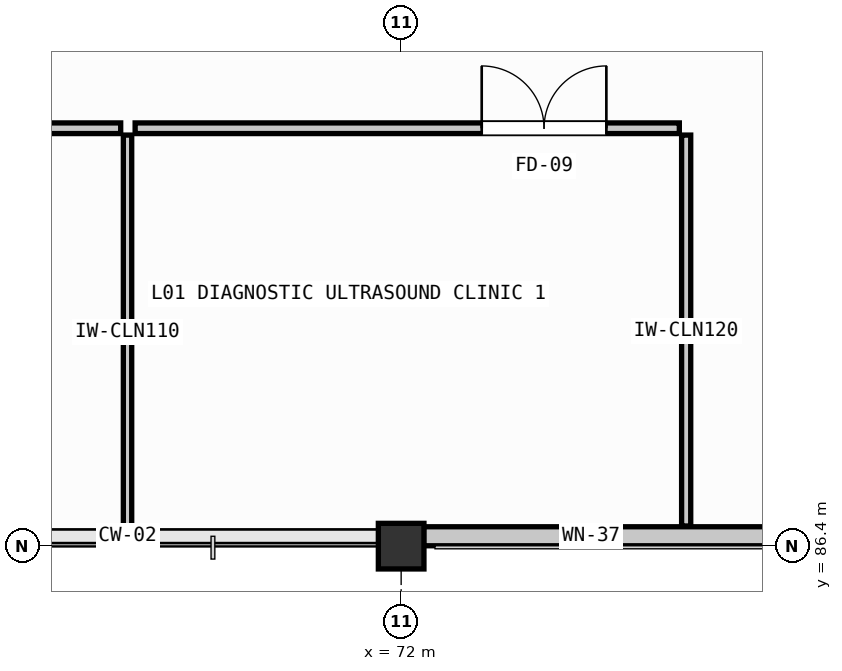
"""IFC4 building model, lengths in metres.
Left out: names, types, materials, properties, quantities, classifications, styles, units other than length and angle.
Written with IfcOpenShell. Run it as: python <this file> out.ifc"""

import sys

from ifc_helpers import new_model, si_unit, direction, frame, frame_2d, origin, origin_2d, place, context, subcontext, project, spatial, rectangle, extrude, element, fill, save


model = new_model("IFC4")
c1 = context("Model", 3, precision=1e-05, world=origin(), true_north=direction((0.0, 1.0)))
c2 = subcontext(c1, "Body", "Model", "MODEL_VIEW")
j1 = project(units=[si_unit("LENGTHUNIT", "METRE"), si_unit("PLANEANGLEUNIT", "RADIAN")], contexts=[c1])
p1 = place(None, origin())
s1 = spatial("IfcSite", under=j1, at=p1, CompositionType="ELEMENT")
p2 = place(p1, origin())
s2 = spatial("IfcBuilding", under=s1, at=p2, CompositionType="ELEMENT")
p3 = place(p2, origin())
s3 = spatial("IfcBuildingStorey", under=s2, at=p3, CompositionType="ELEMENT", Elevation=0.0)
p4 = place(p3, frame((72.0, 86.4, -0.25), z_axis=(0.0, 0.0, 1.0), x_axis=(1.0, 0.0, 0.0)))
e1 = element("IfcColumn", 1, at=p4, inside=s3, PredefinedType="COLUMN", context=c2, shape_type="SweptSolid", body=[
    extrude(rectangle(XDim=0.6, YDim=0.6, at=origin_2d()), origin(), (0.0, 0.0, 1.0), 4.78),
])
p5 = place(p3, frame((78.905, 86.53, 0.0), z_axis=(0.0, 0.0, 1.0), x_axis=(-1.0, 0.0, 0.0)))
e2 = element("IfcWall", 2, at=p5, inside=s3, PredefinedType="SOLIDWALL", context=c2, shape_type="SweptSolid", body=[
    extrude(rectangle(XDim=6.61, YDim=0.25, at=frame_2d((3.305, 0.0))), origin(), (0.0, 0.0, 1.0), 3.73),
])
p6 = place(p5, frame((4.03, 0.0, 0.95)))
e3 = element("IfcOpeningElement", 3, at=p6, cuts=e2, PredefinedType="OPENING", context=c2, shape_type="SweptSolid", body=[
    extrude(rectangle(XDim=0.75, YDim=1.55, at=frame_2d((0.375, 0.775))), frame((0.0, 0.135, 0.0), z_axis=(0.0, -1.0, 0.0), x_axis=(1.0, 0.0, 0.0)), (0.0, 0.0, 1.0), 0.27),
])
p7 = place(p3, frame((50.542, 91.898, 0.0), z_axis=(0.0, 0.0, 1.0), x_axis=(1.0, 0.0, 0.0)))
e4 = element("IfcWall", 4, at=p7, inside=s3, PredefinedType="PARTITIONING", context=c2, shape_type="SweptSolid", body=[
    extrude(rectangle(XDim=17.768, YDim=0.14, at=frame_2d((8.884, 0.0))), origin(), (0.0, 0.0, 1.0), 3.83),
])
p8 = place(p7, frame((8.414, 0.0, 0.0)))
e5 = element("IfcOpeningElement", 5, at=p8, cuts=e4, PredefinedType="OPENING", context=c2, shape_type="SweptSolid", body=[
    extrude(rectangle(XDim=0.94, YDim=2.1, at=frame_2d((0.47, 1.05))), frame((0.0, 0.08, 0.0), z_axis=(0.0, -1.0, 0.0), x_axis=(1.0, 0.0, 0.0)), (0.0, 0.0, 1.0), 0.16),
])
p9 = place(p3, frame((68.4, 91.808, 0.0), z_axis=(0.0, 0.0, 1.0), x_axis=(0.0, -1.0, 0.0)))
e6 = element("IfcWall", 6, at=p9, inside=s3, PredefinedType="PARTITIONING", context=c2, shape_type="SweptSolid", body=[
    extrude(rectangle(XDim=5.178, YDim=0.11, at=frame_2d((2.589, 0.0))), origin(), (0.0, 0.0, 1.0), 3.73),
])
p10 = place(p3, frame((68.5, 91.898, 0.0), z_axis=(0.0, 0.0, 1.0), x_axis=(1.0, 0.0, 0.0)))
e7 = element("IfcWall", 7, at=p10, inside=s3, PredefinedType="PARTITIONING", context=c2, shape_type="SweptSolid", body=[
    extrude(rectangle(XDim=7.16, YDim=0.14, at=frame_2d((3.58, 0.0))), origin(), (0.0, 0.0, 1.0), 3.83),
])
p11 = place(p10, frame((4.56, 0.0, 0.0)))
e8 = element("IfcOpeningElement", 8, at=p11, cuts=e7, PredefinedType="OPENING", context=c2, shape_type="SweptSolid", body=[
    extrude(rectangle(XDim=1.64, YDim=2.24, at=frame_2d((0.82, 1.12))), frame((0.0, 0.08, 0.0), z_axis=(0.0, -1.0, 0.0), x_axis=(1.0, 0.0, 0.0)), (0.0, 0.0, 1.0), 0.16),
])
p12 = place(p3, frame((75.75, 91.808, 0.0), z_axis=(0.0, 0.0, 1.0), x_axis=(0.0, -1.0, 0.0)))
e9 = element("IfcWall", 9, at=p12, inside=s3, PredefinedType="PARTITIONING", context=c2, shape_type="SweptSolid", body=[
    extrude(rectangle(XDim=5.143, YDim=0.12, at=frame_2d((2.572, 0.0))), origin(), (0.0, 0.0, 1.0), 3.73),
])
p13 = place(p6, origin())
e10 = element("IfcWindow", 10, at=p13, inside=s3, PartitioningType="SINGLE_PANEL", PredefinedType="WINDOW", context=c2, shape_type="SweptSolid", body=[
    extrude(rectangle(XDim=0.75, YDim=1.55, at=frame_2d((0.375, 0.775))), frame((0.0, 0.03, 0.0), z_axis=(0.0, -1.0, 0.0), x_axis=(1.0, 0.0, 0.0)), (0.0, 0.0, 1.0), 0.06),
])
fill(e3, e10)
p14 = place(p11, origin())
e11 = element("IfcDoor", 11, at=p14, inside=s3, OperationType="DOUBLE_DOOR_SINGLE_SWING", PredefinedType="DOOR", context=c2, shape_type="SweptSolid", body=[
    extrude(rectangle(XDim=1.64, YDim=2.24, at=frame_2d((0.82, 1.12))), frame((0.0, 0.025, 0.0), z_axis=(0.0, -1.0, 0.0), x_axis=(1.0, 0.0, 0.0)), (0.0, 0.0, 1.0), 0.05),
])
fill(e8, e11)
save(model, sys.argv[1])
